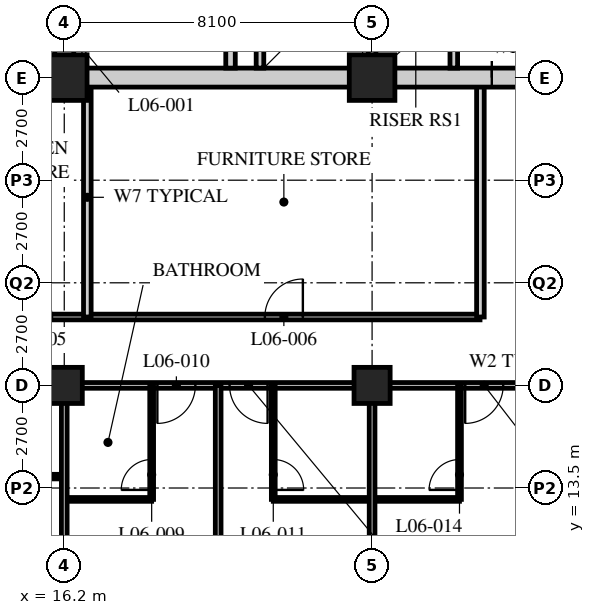
"""IFC4 building model, lengths in metres.
Left out: names, types, materials, properties, quantities, classifications, styles, units other than length and angle.
Written with IfcOpenShell. Run it as: python <this file> out.ifc"""

import sys

from ifc_helpers import new_model, si_unit, direction, frame, frame_2d, origin, origin_2d, place, context, subcontext, project, spatial, rectangle, hollow_rectangle, extrude, element, fill, save


model = new_model("IFC4")
c1 = context("Model", 3, precision=1e-05, world=origin(), true_north=direction((0.0, 1.0)))
c2 = subcontext(c1, "Body", "Model", "MODEL_VIEW")
j1 = project(units=[si_unit("LENGTHUNIT", "METRE"), si_unit("PLANEANGLEUNIT", "RADIAN")], contexts=[c1])
p1 = place(None, origin())
s1 = spatial("IfcSite", under=j1, at=p1, CompositionType="ELEMENT")
p2 = place(p1, origin())
s2 = spatial("IfcBuilding", under=s1, at=p2, CompositionType="ELEMENT")
p3 = place(p2, frame((0.0, 0.0, 33.0)))
s3 = spatial("IfcBuildingStorey", under=s2, at=p3, CompositionType="ELEMENT", Elevation=33.0)
p4 = place(p3, frame((16.2, 16.2, 0.0), z_axis=(0.0, 0.0, 1.0), x_axis=(1.0, 0.0, 0.0)))
e1 = element("IfcColumn", 1, at=p4, inside=s3, PredefinedType="COLUMN", context=c2, shape_type="SweptSolid", body=[
    extrude(hollow_rectangle(XDim=0.95, YDim=0.95, WallThickness=0.095, at=origin_2d()), origin(), (0.0, 0.0, 1.0), 3.4),
])
p5 = place(p3, frame((16.2, 24.3, 0.0), z_axis=(0.0, 0.0, 1.0), x_axis=(1.0, 0.0, 0.0)))
e2 = element("IfcColumn", 2, at=p5, inside=s3, PredefinedType="COLUMN", context=c2, shape_type="SweptSolid", body=[
    extrude(hollow_rectangle(XDim=1.2, YDim=1.2, WallThickness=0.12, at=origin_2d()), origin(), (0.0, 0.0, 1.0), 3.4),
])
p6 = place(p3, frame((24.3, 16.2, 0.0), z_axis=(0.0, 0.0, 1.0), x_axis=(1.0, 0.0, 0.0)))
e3 = element("IfcColumn", 3, at=p6, inside=s3, PredefinedType="COLUMN", context=c2, shape_type="SweptSolid", body=[
    extrude(hollow_rectangle(XDim=0.95, YDim=0.95, WallThickness=0.095, at=origin_2d()), origin(), (0.0, 0.0, 1.0), 3.4),
])
p7 = place(p3, frame((24.3, 24.3, 0.0), z_axis=(0.0, 0.0, 1.0), x_axis=(1.0, 0.0, 0.0)))
e4 = element("IfcColumn", 4, at=p7, inside=s3, PredefinedType="COLUMN", context=c2, shape_type="SweptSolid", body=[
    extrude(hollow_rectangle(XDim=1.2, YDim=1.2, WallThickness=0.12, at=origin_2d()), origin(), (0.0, 0.0, 1.0), 3.4),
])
p8 = place(p3, frame((12.15, 16.2, 0.0), z_axis=(0.0, 0.0, 1.0), x_axis=(1.0, 0.0, 0.0)))
e5 = element("IfcWall", 5, at=p8, inside=s3, PredefinedType="PARTITIONING", context=c2, shape_type="SweptSolid", body=[
    extrude(rectangle(XDim=32.4, YDim=0.15, at=frame_2d((16.2, 0.0))), origin(), (0.0, 0.0, 1.0), 2.578),
])
p9 = place(p8, frame((6.5, 0.0, 0.0)))
e6 = element("IfcOpeningElement", 6, at=p9, cuts=e5, PredefinedType="OPENING", context=c2, shape_type="SweptSolid", body=[
    extrude(rectangle(XDim=1.0, YDim=2.1, at=frame_2d((0.5, 1.05))), frame((0.0, 0.085, 0.0), z_axis=(0.0, -1.0, 0.0), x_axis=(1.0, 0.0, 0.0)), (0.0, 0.0, 1.0), 0.17),
])
p10 = place(p8, frame((8.4, 0.0, 0.0)))
e7 = element("IfcOpeningElement", 7, at=p10, cuts=e5, PredefinedType="OPENING", context=c2, shape_type="SweptSolid", body=[
    extrude(rectangle(XDim=1.0, YDim=2.1, at=frame_2d((0.5, 1.05))), frame((0.0, 0.085, 0.0), z_axis=(0.0, -1.0, 0.0), x_axis=(1.0, 0.0, 0.0)), (0.0, 0.0, 1.0), 0.17),
])
p11 = place(p8, frame((14.6, 0.0, 0.0)))
e8 = element("IfcOpeningElement", 8, at=p11, cuts=e5, PredefinedType="OPENING", context=c2, shape_type="SweptSolid", body=[
    extrude(rectangle(XDim=1.0, YDim=2.1, at=frame_2d((0.5, 1.05))), frame((0.0, 0.085, 0.0), z_axis=(0.0, -1.0, 0.0), x_axis=(1.0, 0.0, 0.0)), (0.0, 0.0, 1.0), 0.17),
])
p12 = place(p8, frame((16.5, 0.0, 0.0)))
e9 = element("IfcOpeningElement", 9, at=p12, cuts=e5, PredefinedType="OPENING", context=c2, shape_type="SweptSolid", body=[
    extrude(rectangle(XDim=1.0, YDim=2.1, at=frame_2d((0.5, 1.05))), frame((0.0, 0.085, 0.0), z_axis=(0.0, -1.0, 0.0), x_axis=(1.0, 0.0, 0.0)), (0.0, 0.0, 1.0), 0.17),
])
p13 = place(p8, frame((23.0, 0.0, 0.0)))
e10 = element("IfcOpeningElement", 10, at=p13, cuts=e5, PredefinedType="OPENING", context=c2, shape_type="SweptSolid", body=[
    extrude(rectangle(XDim=1.0, YDim=2.1, at=frame_2d((0.5, 1.05))), frame((0.0, 0.085, 0.0), z_axis=(0.0, -1.0, 0.0), x_axis=(1.0, 0.0, 0.0)), (0.0, 0.0, 1.0), 0.17),
])
p14 = place(p8, frame((24.6, 0.0, 0.0)))
e11 = element("IfcOpeningElement", 11, at=p14, cuts=e5, PredefinedType="OPENING", context=c2, shape_type="SweptSolid", body=[
    extrude(rectangle(XDim=1.0, YDim=2.1, at=frame_2d((0.5, 1.05))), frame((0.0, 0.085, 0.0), z_axis=(0.0, -1.0, 0.0), x_axis=(1.0, 0.0, 0.0)), (0.0, 0.0, 1.0), 0.17),
])
p15 = place(p8, frame((1.525, 0.0, 0.0)))
e12 = element("IfcOpeningElement", 12, at=p15, cuts=e5, PredefinedType="OPENING", context=c2, shape_type="SweptSolid", body=[
    extrude(rectangle(XDim=1.0, YDim=2.1, at=frame_2d((0.5, 1.05))), frame((0.0, 0.085, 0.0), z_axis=(0.0, -1.0, 0.0), x_axis=(1.0, 0.0, 0.0)), (0.0, 0.0, 1.0), 0.17),
])
p16 = place(p8, frame((29.875, 0.0, 0.0)))
e13 = element("IfcOpeningElement", 13, at=p16, cuts=e5, PredefinedType="OPENING", context=c2, shape_type="SweptSolid", body=[
    extrude(rectangle(XDim=1.0, YDim=2.1, at=frame_2d((0.5, 1.05))), frame((0.0, 0.085, 0.0), z_axis=(0.0, -1.0, 0.0), x_axis=(1.0, 0.0, 0.0)), (0.0, 0.0, 1.0), 0.17),
])
p17 = place(p3, frame((13.95, 18.0, 0.0), z_axis=(0.0, 0.0, 1.0), x_axis=(1.0, 0.0, 0.0)))
e14 = element("IfcWall", 14, at=p17, inside=s3, PredefinedType="PARTITIONING", context=c2, shape_type="SweptSolid", body=[
    extrude(rectangle(XDim=13.19, YDim=0.15, at=frame_2d((6.595, 0.0))), origin(), (0.0, 0.0, 1.0), 3.19),
])
p18 = place(p17, frame((0.929, 0.0, 0.0)))
e15 = element("IfcOpeningElement", 15, at=p18, cuts=e14, PredefinedType="OPENING", context=c2, shape_type="SweptSolid", body=[
    extrude(rectangle(XDim=1.0, YDim=2.1, at=frame_2d((0.5, 1.05))), frame((0.0, 0.085, 0.0), z_axis=(0.0, -1.0, 0.0), x_axis=(1.0, 0.0, 0.0)), (0.0, 0.0, 1.0), 0.17),
])
p19 = place(p17, frame((7.529, 0.0, 0.0)))
e16 = element("IfcOpeningElement", 16, at=p19, cuts=e14, PredefinedType="OPENING", context=c2, shape_type="SweptSolid", body=[
    extrude(rectangle(XDim=1.0, YDim=2.1, at=frame_2d((0.5, 1.05))), frame((0.0, 0.085, 0.0), z_axis=(0.0, -1.0, 0.0), x_axis=(1.0, 0.0, 0.0)), (0.0, 0.0, 1.0), 0.17),
])
for number, where, z_axis, x_axis in (
    (17, (16.807, 18.0, 0.0), (0.0, 0.0, 1.0), (0.0, 1.0, 0.0)),
    (18, (27.15, 18.0, 0.0), (0.0, 0.0, 1.0), (0.0, 1.0, 0.0)),
):
    element("IfcWall", number, at=place(p3, frame(where, z_axis=z_axis, x_axis=x_axis)), inside=s3, PredefinedType="SOLIDWALL", context=c2, shape_type="SweptSolid", body=[
        extrude(rectangle(XDim=6.3, YDim=0.2, at=frame_2d((3.15, 0.0))), origin(), (0.0, 0.0, 1.0), 3.19),
    ])
p20 = place(p3, frame((13.95, 24.3, 0.0), z_axis=(0.0, 0.0, 1.0), x_axis=(1.0, 0.0, 0.0)))
e19 = element("IfcWall", 19, at=p20, inside=s3, PredefinedType="SOLIDWALL", context=c2, shape_type="SweptSolid", body=[
    extrude(rectangle(XDim=2.25, YDim=0.2, at=frame_2d((1.125, 0.0))), origin(), (0.0, 0.0, 1.0), 2.578),
])
p21 = place(p3, frame((16.2, 13.2, 0.0), z_axis=(0.0, 0.0, 1.0), x_axis=(1.0, 0.0, 0.0)))
e20 = element("IfcWall", 20, at=p21, inside=s3, PredefinedType="PARTITIONING", context=c2, shape_type="SweptSolid", body=[
    extrude(rectangle(XDim=2.3, YDim=0.1, at=frame_2d((1.15, 0.0))), origin(), (0.0, 0.0, 1.0), 3.19),
])
p22 = place(p3, frame((18.5, 16.2, 0.0), z_axis=(0.0, 0.0, 1.0), x_axis=(0.0, -1.0, 0.0)))
e21 = element("IfcWall", 21, at=p22, inside=s3, PredefinedType="PARTITIONING", context=c2, shape_type="SweptSolid", body=[
    extrude(rectangle(XDim=3.0, YDim=0.1, at=frame_2d((1.5, 0.0))), origin(), (0.0, 0.0, 1.0), 3.19),
])
p23 = place(p22, frame((1.95, 0.0, 0.0)))
e22 = element("IfcOpeningElement", 22, at=p23, cuts=e21, PredefinedType="OPENING", context=c2, shape_type="SweptSolid", body=[
    extrude(rectangle(XDim=0.8, YDim=2.1, at=frame_2d((0.4, 1.05))), frame((0.0, 0.06, 0.0), z_axis=(0.0, -1.0, 0.0), x_axis=(1.0, 0.0, 0.0)), (0.0, 0.0, 1.0), 0.12),
])
p24 = place(p3, frame((21.7, 13.2, 0.0), z_axis=(0.0, 0.0, 1.0), x_axis=(1.0, 0.0, 0.0)))
e23 = element("IfcWall", 23, at=p24, inside=s3, PredefinedType="PARTITIONING", context=c2, shape_type="SweptSolid", body=[
    extrude(rectangle(XDim=4.9, YDim=0.1, at=frame_2d((2.45, 0.0))), origin(), (0.0, 0.0, 1.0), 3.19),
])
p25 = place(p3, frame((21.7, 16.2, 0.0), z_axis=(0.0, 0.0, 1.0), x_axis=(0.0, -1.0, 0.0)))
e24 = element("IfcWall", 24, at=p25, inside=s3, PredefinedType="PARTITIONING", context=c2, shape_type="SweptSolid", body=[
    extrude(rectangle(XDim=3.0, YDim=0.1, at=frame_2d((1.5, 0.0))), origin(), (0.0, 0.0, 1.0), 3.19),
])
p26 = place(p25, frame((1.95, 0.0, 0.0)))
e25 = element("IfcOpeningElement", 25, at=p26, cuts=e24, PredefinedType="OPENING", context=c2, shape_type="SweptSolid", body=[
    extrude(rectangle(XDim=0.8, YDim=2.1, at=frame_2d((0.4, 1.05))), frame((0.0, 0.06, 0.0), z_axis=(0.0, -1.0, 0.0), x_axis=(1.0, 0.0, 0.0)), (0.0, 0.0, 1.0), 0.12),
])
p27 = place(p3, frame((20.25, 16.2, 0.0), z_axis=(0.0, 0.0, 1.0), x_axis=(0.0, -1.0, 0.0)))
e26 = element("IfcWall", 26, at=p27, inside=s3, PredefinedType="PARTITIONING", context=c2, shape_type="SweptSolid", body=[
    extrude(rectangle(XDim=15.9, YDim=0.15, at=frame_2d((7.95, 0.0))), origin(), (0.0, 0.0, 1.0), 3.19),
])
p28 = place(p27, frame((8.975, 0.0, 0.0)))
e27 = element("IfcOpeningElement", 27, at=p28, cuts=e26, PredefinedType="OPENING", context=c2, shape_type="SweptSolid", body=[
    extrude(rectangle(XDim=0.85, YDim=2.1, at=frame_2d((0.425, 1.05))), frame((0.0, 0.085, 0.0), z_axis=(0.0, -1.0, 0.0), x_axis=(1.0, 0.0, 0.0)), (0.0, 0.0, 1.0), 0.17),
])
p29 = place(p3, frame((24.3, 16.2, 0.0), z_axis=(0.0, 0.0, 1.0), x_axis=(0.0, -1.0, 0.0)))
e28 = element("IfcWall", 28, at=p29, inside=s3, PredefinedType="PARTITIONING", context=c2, shape_type="SweptSolid", body=[
    extrude(rectangle(XDim=15.9, YDim=0.15, at=frame_2d((7.95, 0.0))), origin(), (0.0, 0.0, 1.0), 2.578),
])
p30 = place(p3, frame((26.6, 16.2, 0.0), z_axis=(0.0, 0.0, 1.0), x_axis=(0.0, -1.0, 0.0)))
e29 = element("IfcWall", 29, at=p30, inside=s3, PredefinedType="PARTITIONING", context=c2, shape_type="SweptSolid", body=[
    extrude(rectangle(XDim=3.0, YDim=0.1, at=frame_2d((1.5, 0.0))), origin(), (0.0, 0.0, 1.0), 3.19),
])
p31 = place(p30, frame((1.95, 0.0, 0.0)))
e30 = element("IfcOpeningElement", 30, at=p31, cuts=e29, PredefinedType="OPENING", context=c2, shape_type="SweptSolid", body=[
    extrude(rectangle(XDim=0.8, YDim=2.1, at=frame_2d((0.4, 1.05))), frame((0.0, 0.06, 0.0), z_axis=(0.0, -1.0, 0.0), x_axis=(1.0, 0.0, 0.0)), (0.0, 0.0, 1.0), 0.12),
])
p32 = place(p3, frame((8.15, 13.8, 0.0), z_axis=(0.0, 0.0, 1.0), x_axis=(1.0, 0.0, 0.0)))
e31 = element("IfcWall", 31, at=p32, inside=s3, PredefinedType="PARTITIONING", context=c2, shape_type="SweptSolid", body=[
    extrude(rectangle(XDim=8.05, YDim=0.12, at=frame_2d((4.025, 0.0))), origin(), (0.0, 0.0, 1.0), 3.19),
])
p33 = place(p32, frame((6.725, 0.0, 0.0)))
e32 = element("IfcOpeningElement", 32, at=p33, cuts=e31, PredefinedType="OPENING", context=c2, shape_type="SweptSolid", body=[
    extrude(rectangle(XDim=0.85, YDim=2.1, at=frame_2d((0.425, 1.05))), frame((0.0, 0.07, 0.0), z_axis=(0.0, -1.0, 0.0), x_axis=(1.0, 0.0, 0.0)), (0.0, 0.0, 1.0), 0.14),
])
p34 = place(p32, frame((2.875, 0.0, 0.0)))
e33 = element("IfcOpeningElement", 33, at=p34, cuts=e31, PredefinedType="OPENING", context=c2, shape_type="SweptSolid", body=[
    extrude(rectangle(XDim=0.85, YDim=2.1, at=frame_2d((0.425, 1.05))), frame((0.0, 0.07, 0.0), z_axis=(0.0, -1.0, 0.0), x_axis=(1.0, 0.0, 0.0)), (0.0, 0.0, 1.0), 0.14),
])
p35 = place(p3, frame((16.2, 16.2, 0.0), z_axis=(0.0, 0.0, 1.0), x_axis=(0.0, -1.0, 0.0)))
e34 = element("IfcWall", 34, at=p35, inside=s3, PredefinedType="PARTITIONING", context=c2, shape_type="SweptSolid", body=[
    extrude(rectangle(XDim=15.9, YDim=0.15, at=frame_2d((7.95, 0.0))), origin(), (0.0, 0.0, 1.0), 2.578),
])
p36 = place(p3, frame((15.95, 24.3, 0.0), z_axis=(0.0, 0.0, 1.0), x_axis=(1.0, 0.0, 0.0)))
e35 = element("IfcWall", 35, at=p36, inside=s3, PredefinedType="SOLIDWALL", context=c2, shape_type="SweptSolid", body=[
    extrude(rectangle(XDim=24.8, YDim=0.5, at=frame_2d((12.4, 0.0))), origin(), (0.0, 0.0, 1.0), 2.54),
])
p37 = place(p36, frame((11.5, 0.0, 0.0)))
e36 = element("IfcOpeningElement", 36, at=p37, cuts=e35, PredefinedType="OPENING", context=c2, shape_type="SweptSolid", body=[
    extrude(rectangle(XDim=1.8, YDim=2.4, at=frame_2d((0.9, 1.2))), frame((0.0, 0.26, 0.0), z_axis=(0.0, -1.0, 0.0), x_axis=(1.0, 0.0, 0.0)), (0.0, 0.0, 1.0), 0.52),
])
p38 = place(p3, frame((16.2, 24.55, 0.0), z_axis=(0.0, 0.0, 1.0), x_axis=(0.0, 1.0, 0.0)))
e37 = element("IfcWall", 37, at=p38, inside=s3, PredefinedType="SOLIDWALL", context=c2, shape_type="SweptSolid", body=[
    extrude(rectangle(XDim=15.7, YDim=0.5, at=frame_2d((7.85, 0.0))), origin(), (0.0, 0.0, 1.0), 2.578),
])
p39 = place(p3, frame((24.3, 24.55, 0.0), z_axis=(0.0, 0.0, 1.0), x_axis=(0.0, 1.0, 0.0)))
e38 = element("IfcWall", 38, at=p39, inside=s3, PredefinedType="SOLIDWALL", context=c2, shape_type="SweptSolid", body=[
    extrude(rectangle(XDim=7.75, YDim=0.2, at=frame_2d((3.875, 0.0))), origin(), (0.0, 0.0, 1.0), 2.578),
])
p40 = place(p39, frame((4.6, 0.0, 0.0)))
e39 = element("IfcOpeningElement", 39, at=p40, cuts=e38, PredefinedType="OPENING", context=c2, shape_type="SweptSolid", body=[
    extrude(rectangle(XDim=1.2, YDim=2.1, at=frame_2d((0.6, 1.05))), frame((0.0, 0.11, 0.0), z_axis=(0.0, -1.0, 0.0), x_axis=(1.0, 0.0, 0.0)), (0.0, 0.0, 1.0), 0.22),
])
p41 = place(p3, frame((20.575, 24.55, 0.0), z_axis=(0.0, 0.0, 1.0), x_axis=(0.0, 1.0, 0.0)))
e40 = element("IfcWall", 40, at=p41, inside=s3, PredefinedType="SOLIDWALL", context=c2, shape_type="SweptSolid", body=[
    extrude(rectangle(XDim=7.75, YDim=0.25, at=frame_2d((3.875, 0.0))), origin(), (0.0, 0.0, 1.0), 3.19),
])
p42 = place(p41, frame((6.2, 0.0, 0.0)))
e41 = element("IfcOpeningElement", 41, at=p42, cuts=e40, PredefinedType="OPENING", context=c2, shape_type="SweptSolid", body=[
    extrude(rectangle(XDim=1.2, YDim=2.1, at=frame_2d((0.6, 1.05))), frame((0.0, 0.135, 0.0), z_axis=(0.0, -1.0, 0.0), x_axis=(1.0, 0.0, 0.0)), (0.0, 0.0, 1.0), 0.27),
])
p43 = place(p3, frame((21.35, 24.55, 0.0), z_axis=(0.0, 0.0, 1.0), x_axis=(0.0, 1.0, 0.0)))
e42 = element("IfcWall", 42, at=p43, inside=s3, PredefinedType="SOLIDWALL", context=c2, shape_type="SweptSolid", body=[
    extrude(rectangle(XDim=2.6, YDim=0.2, at=frame_2d((1.3, 0.0))), origin(), (0.0, 0.0, 1.0), 3.19),
])
p44 = place(p3, frame((26.45, 24.55, 0.0), z_axis=(0.0, 0.0, 1.0), x_axis=(0.0, 1.0, 0.0)))
e43 = element("IfcWall", 43, at=p44, inside=s3, PredefinedType="SOLIDWALL", context=c2, shape_type="SweptSolid", body=[
    extrude(rectangle(XDim=1.6, YDim=0.2, at=frame_2d((0.8, 0.0))), origin(), (0.0, 0.0, 1.0), 3.19),
])
p45 = place(p19, origin())
e44 = element("IfcDoor", 44, at=p45, inside=s3, OperationType="SINGLE_SWING_RIGHT", PredefinedType="DOOR", context=c2, shape_type="SweptSolid", body=[
    extrude(rectangle(XDim=1.0, YDim=2.1, at=frame_2d((0.5, 1.05))), frame((0.0, 0.025, 0.0), z_axis=(0.0, -1.0, 0.0), x_axis=(1.0, 0.0, 0.0)), (0.0, 0.0, 1.0), 0.05),
])
fill(e16, e44)
p46 = place(p23, origin())
e45 = element("IfcDoor", 45, at=p46, inside=s3, OperationType="SINGLE_SWING_LEFT", PredefinedType="DOOR", context=c2, shape_type="SweptSolid", body=[
    extrude(rectangle(XDim=0.8, YDim=2.1, at=frame_2d((0.4, 1.05))), frame((0.0, 0.025, 0.0), z_axis=(0.0, -1.0, 0.0), x_axis=(1.0, 0.0, 0.0)), (0.0, 0.0, 1.0), 0.05),
])
fill(e22, e45)
p47 = place(p9, origin())
e46 = element("IfcDoor", 46, at=p47, inside=s3, OperationType="SINGLE_SWING_RIGHT", PredefinedType="DOOR", context=c2, shape_type="SweptSolid", body=[
    extrude(rectangle(XDim=1.0, YDim=2.1, at=frame_2d((0.5, 1.05))), frame((0.0, 0.025, 0.0), z_axis=(0.0, -1.0, 0.0), x_axis=(1.0, 0.0, 0.0)), (0.0, 0.0, 1.0), 0.05),
])
fill(e6, e46)
p48 = place(p26, origin())
e47 = element("IfcDoor", 47, at=p48, inside=s3, OperationType="SINGLE_SWING_RIGHT", PredefinedType="DOOR", context=c2, shape_type="SweptSolid", body=[
    extrude(rectangle(XDim=0.8, YDim=2.1, at=frame_2d((0.4, 1.05))), frame((0.0, 0.025, 0.0), z_axis=(0.0, -1.0, 0.0), x_axis=(1.0, 0.0, 0.0)), (0.0, 0.0, 1.0), 0.05),
])
fill(e25, e47)
p49 = place(p10, origin())
e48 = element("IfcDoor", 48, at=p49, inside=s3, OperationType="SINGLE_SWING_LEFT", PredefinedType="DOOR", context=c2, shape_type="SweptSolid", body=[
    extrude(rectangle(XDim=1.0, YDim=2.1, at=frame_2d((0.5, 1.05))), frame((0.0, 0.025, 0.0), z_axis=(0.0, -1.0, 0.0), x_axis=(1.0, 0.0, 0.0)), (0.0, 0.0, 1.0), 0.05),
])
fill(e7, e48)
p50 = place(p31, origin())
e49 = element("IfcDoor", 49, at=p50, inside=s3, OperationType="SINGLE_SWING_LEFT", PredefinedType="DOOR", context=c2, shape_type="SweptSolid", body=[
    extrude(rectangle(XDim=0.8, YDim=2.1, at=frame_2d((0.4, 1.05))), frame((0.0, 0.025, 0.0), z_axis=(0.0, -1.0, 0.0), x_axis=(1.0, 0.0, 0.0)), (0.0, 0.0, 1.0), 0.05),
])
fill(e30, e49)
p51 = place(p11, origin())
e50 = element("IfcDoor", 50, at=p51, inside=s3, OperationType="SINGLE_SWING_RIGHT", PredefinedType="DOOR", context=c2, shape_type="SweptSolid", body=[
    extrude(rectangle(XDim=1.0, YDim=2.1, at=frame_2d((0.5, 1.05))), frame((0.0, 0.025, 0.0), z_axis=(0.0, -1.0, 0.0), x_axis=(1.0, 0.0, 0.0)), (0.0, 0.0, 1.0), 0.05),
])
fill(e8, e50)
p52 = place(p37, origin())
e51 = element("IfcDoor", 51, at=p52, inside=s3, OperationType="DOUBLE_DOOR_SINGLE_SWING", PredefinedType="DOOR", context=c2, shape_type="SweptSolid", body=[
    extrude(rectangle(XDim=1.8, YDim=2.4, at=frame_2d((0.9, 1.2))), frame((0.0, 0.025, 0.0), z_axis=(0.0, -1.0, 0.0), x_axis=(1.0, 0.0, 0.0)), (0.0, 0.0, 1.0), 0.05),
])
fill(e36, e51)
save(model, sys.argv[1])
